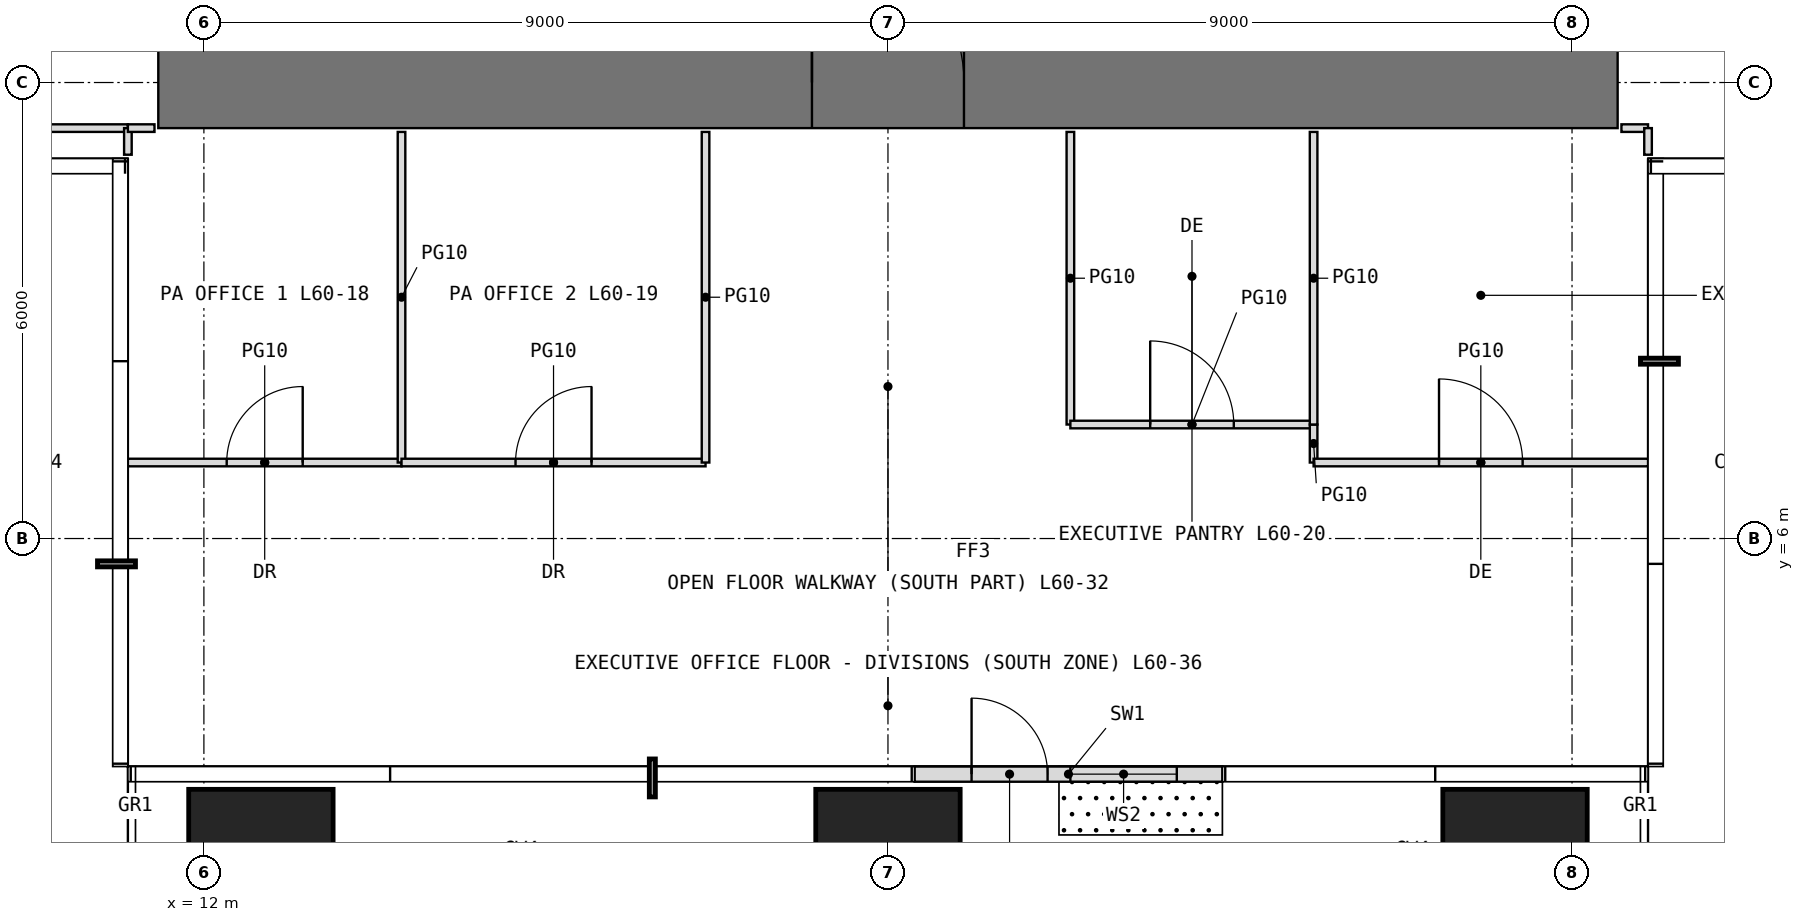
"""IFC4 building model, lengths in metres.
Left out: names, types, materials, properties, quantities, classifications, styles, units other than length and angle.
Written with IfcOpenShell. Run it as: python <this file> out.ifc"""

import sys

from ifc_helpers import new_model, si_unit, direction, frame, frame_2d, origin, origin_2d, place, context, subcontext, project, spatial, rectangle, extrude, element, fill, save


model = new_model("IFC4")
c1 = context("Model", 3, precision=1e-05, world=origin(), true_north=direction((0.0, 1.0)))
c2 = subcontext(c1, "Body", "Model", "MODEL_VIEW")
j1 = project(units=[si_unit("LENGTHUNIT", "METRE"), si_unit("PLANEANGLEUNIT", "RADIAN")], contexts=[c1])
p1 = place(None, origin())
s1 = spatial("IfcSite", under=j1, at=p1, CompositionType="ELEMENT")
p2 = place(p1, origin())
s2 = spatial("IfcBuilding", under=s1, at=p2, CompositionType="ELEMENT")
p3 = place(p2, frame((0.0, 0.0, 252.4)))
s3 = spatial("IfcBuildingStorey", under=s2, at=p3, CompositionType="ELEMENT", Elevation=252.4)
for number, where, z_axis, x_axis in (
    (1, (12.75, 1.75, 0.0), (0.0, 0.0, 1.0), (1.0, 0.0, 0.0)),
    (2, (21.0, 1.75, 0.0), (0.0, 0.0, 1.0), (1.0, 0.0, 0.0)),
    (3, (29.25, 1.75, 0.0), (0.0, 0.0, 1.0), (1.0, 0.0, 0.0)),
):
    element("IfcColumn", number, at=place(p3, frame(where, z_axis=z_axis, x_axis=x_axis)), inside=s3, PredefinedType="COLUMN", context=c2, shape_type="SweptSolid", body=[
        extrude(rectangle(XDim=1.9, YDim=1.9, at=origin_2d()), origin(), (0.0, 0.0, 1.0), 4.2),
    ])
p4 = place(p3, frame((21.35, 2.9, 0.0), z_axis=(0.0, 0.0, 1.0), x_axis=(1.0, 0.0, 0.0)))
e4 = element("IfcWall", 4, at=p4, inside=s3, PredefinedType="USERDEFINED", context=c2, shape_type="SweptSolid", body=[
    extrude(rectangle(XDim=4.05, YDim=0.2, at=frame_2d((2.025, 0.0))), origin(), (0.0, 0.0, 1.0), 3.95),
])
p5 = place(p4, frame((0.75, 0.0, 0.0)))
e5 = element("IfcOpeningElement", 5, at=p5, cuts=e4, PredefinedType="OPENING", context=c2, shape_type="SweptSolid", body=[
    extrude(rectangle(XDim=1.0, YDim=2.4, at=frame_2d((0.5, 1.2))), frame((0.0, 0.11, 0.0), z_axis=(0.0, -1.0, 0.0), x_axis=(1.0, 0.0, 0.0)), (0.0, 0.0, 1.0), 0.22),
])
p6 = place(p4, frame((2.05, 0.0, 0.3)))
e6 = element("IfcOpeningElement", 6, at=p6, cuts=e4, PredefinedType="OPENING", context=c2, shape_type="SweptSolid", body=[
    extrude(rectangle(XDim=1.4, YDim=2.7, at=frame_2d((0.7, 1.35))), frame((0.0, 0.11, 0.0), z_axis=(0.0, -1.0, 0.0), x_axis=(1.0, 0.0, 0.0)), (0.0, 0.0, 1.0), 0.22),
])
p7 = place(p3, frame((11.4, 12.0, -0.05), z_axis=(0.0, 0.0, 1.0), x_axis=(1.0, 0.0, 0.0)))
e7 = element("IfcWall", 7, at=p7, inside=s3, PredefinedType="SHEAR", context=c2, shape_type="SweptSolid", body=[
    extrude(rectangle(XDim=19.2, YDim=1.2, at=frame_2d((9.6, 0.0))), origin(), (0.0, 0.0, 1.0), 4.2),
])
p8 = place(p7, frame((8.6, 0.0, 0.05)))
e8 = element("IfcOpeningElement", 8, at=p8, cuts=e7, PredefinedType="OPENING", context=c2, shape_type="SweptSolid", body=[
    extrude(rectangle(XDim=2.0, YDim=2.2, at=frame_2d((1.0, 1.1))), frame((0.0, 0.61, 0.0), z_axis=(0.0, -1.0, 0.0), x_axis=(1.0, 0.0, 0.0)), (0.0, 0.0, 1.0), 1.22),
])
p9 = place(p3, frame((8.4, 11.4, 0.0), z_axis=(0.0, 0.0, 1.0), x_axis=(1.0, 0.0, 0.0)))
e9 = element("IfcWall", 9, at=p9, inside=s3, PredefinedType="PARTITIONING", context=c2, shape_type="SweptSolid", body=[
    extrude(rectangle(XDim=2.6, YDim=0.1, at=frame_2d((1.3, 0.0))), origin(), (0.0, 0.0, 1.0), 3.95),
])
p10 = place(p3, frame((11.0, 7.0, 0.0), z_axis=(0.0, 0.0, 1.0), x_axis=(1.0, 0.0, 0.0)))
e10 = element("IfcWall", 10, at=p10, inside=s3, PredefinedType="PARTITIONING", context=c2, shape_type="SweptSolid", body=[
    extrude(rectangle(XDim=3.6, YDim=0.1, at=frame_2d((1.8, 0.0))), origin(), (0.0, 0.0, 1.0), 3.95),
])
p11 = place(p10, frame((1.3, 0.0, 0.0)))
e11 = element("IfcOpeningElement", 11, at=p11, cuts=e10, PredefinedType="OPENING", context=c2, shape_type="SweptSolid", body=[
    extrude(rectangle(XDim=1.0, YDim=2.2, at=frame_2d((0.5, 1.1))), frame((0.0, 0.06, 0.0), z_axis=(0.0, -1.0, 0.0), x_axis=(1.0, 0.0, 0.0)), (0.0, 0.0, 1.0), 0.12),
])
p12 = place(p3, frame((11.0, 11.05, 0.0), z_axis=(0.0, 0.0, 1.0), x_axis=(0.0, 1.0, 0.0)))
e12 = element("IfcWall", 12, at=p12, inside=s3, PredefinedType="PARTITIONING", context=c2, shape_type="SweptSolid", body=[
    extrude(rectangle(XDim=0.35, YDim=0.1, at=frame_2d((0.175, 0.0))), origin(), (0.0, 0.0, 1.0), 3.95),
])
p13 = place(p3, frame((11.0, 11.4, 0.0), z_axis=(0.0, 0.0, 1.0), x_axis=(1.0, 0.0, 0.0)))
e13 = element("IfcWall", 13, at=p13, inside=s3, PredefinedType="PARTITIONING", context=c2, shape_type="SweptSolid", body=[
    extrude(rectangle(XDim=0.35, YDim=0.1, at=frame_2d((0.175, 0.0))), origin(), (0.0, 0.0, 1.0), 3.95),
])
p14 = place(p3, frame((14.6, 7.0, 0.0), z_axis=(0.0, 0.0, 1.0), x_axis=(0.0, 1.0, 0.0)))
e14 = element("IfcWall", 14, at=p14, inside=s3, PredefinedType="PARTITIONING", context=c2, shape_type="SweptSolid", body=[
    extrude(rectangle(XDim=4.35, YDim=0.1, at=frame_2d((2.175, 0.0))), origin(), (0.0, 0.0, 1.0), 3.95),
])
p15 = place(p3, frame((14.6, 7.0, 0.0), z_axis=(0.0, 0.0, 1.0), x_axis=(1.0, 0.0, 0.0)))
e15 = element("IfcWall", 15, at=p15, inside=s3, PredefinedType="PARTITIONING", context=c2, shape_type="SweptSolid", body=[
    extrude(rectangle(XDim=4.0, YDim=0.1, at=frame_2d((2.0, 0.0))), origin(), (0.0, 0.0, 1.0), 3.95),
])
p16 = place(p15, frame((1.5, 0.0, 0.0)))
e16 = element("IfcOpeningElement", 16, at=p16, cuts=e15, PredefinedType="OPENING", context=c2, shape_type="SweptSolid", body=[
    extrude(rectangle(XDim=1.0, YDim=2.2, at=frame_2d((0.5, 1.1))), frame((0.0, 0.06, 0.0), z_axis=(0.0, -1.0, 0.0), x_axis=(1.0, 0.0, 0.0)), (0.0, 0.0, 1.0), 0.12),
])
p17 = place(p3, frame((18.6, 7.0, 0.0), z_axis=(0.0, 0.0, 1.0), x_axis=(0.0, 1.0, 0.0)))
e17 = element("IfcWall", 17, at=p17, inside=s3, PredefinedType="PARTITIONING", context=c2, shape_type="SweptSolid", body=[
    extrude(rectangle(XDim=4.35, YDim=0.1, at=frame_2d((2.175, 0.0))), origin(), (0.0, 0.0, 1.0), 3.95),
])
p18 = place(p3, frame((23.4, 7.5, 0.0), z_axis=(0.0, 0.0, 1.0), x_axis=(0.0, 1.0, 0.0)))
e18 = element("IfcWall", 18, at=p18, inside=s3, PredefinedType="PARTITIONING", context=c2, shape_type="SweptSolid", body=[
    extrude(rectangle(XDim=3.85, YDim=0.1, at=frame_2d((1.925, 0.0))), origin(), (0.0, 0.0, 1.0), 3.95),
])
p19 = place(p3, frame((23.4, 7.5, 0.0), z_axis=(0.0, 0.0, 1.0), x_axis=(1.0, 0.0, 0.0)))
e19 = element("IfcWall", 19, at=p19, inside=s3, PredefinedType="PARTITIONING", context=c2, shape_type="SweptSolid", body=[
    extrude(rectangle(XDim=3.2, YDim=0.1, at=frame_2d((1.6, 0.0))), origin(), (0.0, 0.0, 1.0), 3.95),
])
p20 = place(p19, frame((1.05, 0.0, 0.0)))
e20 = element("IfcOpeningElement", 20, at=p20, cuts=e19, PredefinedType="OPENING", context=c2, shape_type="SweptSolid", body=[
    extrude(rectangle(XDim=1.1, YDim=2.3, at=frame_2d((0.55, 1.15))), frame((0.0, 0.06, 0.0), z_axis=(0.0, -1.0, 0.0), x_axis=(1.0, 0.0, 0.0)), (0.0, 0.0, 1.0), 0.12),
])
p21 = place(p3, frame((26.6, 7.0, 0.0), z_axis=(0.0, 0.0, 1.0), x_axis=(0.0, 1.0, 0.0)))
e21 = element("IfcWall", 21, at=p21, inside=s3, PredefinedType="PARTITIONING", context=c2, shape_type="SweptSolid", body=[
    extrude(rectangle(XDim=0.5, YDim=0.1, at=frame_2d((0.25, 0.0))), origin(), (0.0, 0.0, 1.0), 3.95),
])
p22 = place(p3, frame((26.6, 7.0, 0.0), z_axis=(0.0, 0.0, 1.0), x_axis=(1.0, 0.0, 0.0)))
e22 = element("IfcWall", 22, at=p22, inside=s3, PredefinedType="PARTITIONING", context=c2, shape_type="SweptSolid", body=[
    extrude(rectangle(XDim=4.4, YDim=0.1, at=frame_2d((2.2, 0.0))), origin(), (0.0, 0.0, 1.0), 3.95),
])
p23 = place(p22, frame((1.65, 0.0, 0.0)))
e23 = element("IfcOpeningElement", 23, at=p23, cuts=e22, PredefinedType="OPENING", context=c2, shape_type="SweptSolid", body=[
    extrude(rectangle(XDim=1.1, YDim=2.3, at=frame_2d((0.55, 1.15))), frame((0.0, 0.06, 0.0), z_axis=(0.0, -1.0, 0.0), x_axis=(1.0, 0.0, 0.0)), (0.0, 0.0, 1.0), 0.12),
])
p24 = place(p3, frame((26.6, 7.5, 0.0), z_axis=(0.0, 0.0, 1.0), x_axis=(0.0, 1.0, 0.0)))
e24 = element("IfcWall", 24, at=p24, inside=s3, PredefinedType="PARTITIONING", context=c2, shape_type="SweptSolid", body=[
    extrude(rectangle(XDim=3.85, YDim=0.1, at=frame_2d((1.925, 0.0))), origin(), (0.0, 0.0, 1.0), 3.95),
])
p25 = place(p3, frame((30.65, 11.4, 0.0), z_axis=(0.0, 0.0, 1.0), x_axis=(1.0, 0.0, 0.0)))
e25 = element("IfcWall", 25, at=p25, inside=s3, PredefinedType="PARTITIONING", context=c2, shape_type="SweptSolid", body=[
    extrude(rectangle(XDim=0.35, YDim=0.1, at=frame_2d((0.175, 0.0))), origin(), (0.0, 0.0, 1.0), 3.95),
])
p26 = place(p3, frame((31.0, 11.05, 0.0), z_axis=(0.0, 0.0, 1.0), x_axis=(0.0, 1.0, 0.0)))
e26 = element("IfcWall", 26, at=p26, inside=s3, PredefinedType="PARTITIONING", context=c2, shape_type="SweptSolid", body=[
    extrude(rectangle(XDim=0.35, YDim=0.1, at=frame_2d((0.175, 0.0))), origin(), (0.0, 0.0, 1.0), 3.95),
])
p27 = place(p5, origin())
e27 = element("IfcDoor", 27, at=p27, inside=s3, OperationType="SINGLE_SWING_LEFT", PredefinedType="DOOR", context=c2, shape_type="SweptSolid", body=[
    extrude(rectangle(XDim=1.0, YDim=2.4, at=frame_2d((0.5, 1.2))), frame((0.0, 0.025, 0.0), z_axis=(0.0, -1.0, 0.0), x_axis=(1.0, 0.0, 0.0)), (0.0, 0.0, 1.0), 0.05),
])
fill(e5, e27)
p28 = place(p6, origin())
e28 = element("IfcWindow", 28, at=p28, inside=s3, PartitioningType="SINGLE_PANEL", PredefinedType="WINDOW", context=c2, shape_type="SweptSolid", body=[
    extrude(rectangle(XDim=1.4, YDim=2.7, at=frame_2d((0.7, 1.35))), frame((0.0, 0.03, 0.0), z_axis=(0.0, -1.0, 0.0), x_axis=(1.0, 0.0, 0.0)), (0.0, 0.0, 1.0), 0.06),
])
fill(e6, e28)
p29 = place(p8, origin())
e29 = element("IfcDoor", 29, at=p29, inside=s3, OperationType="DOUBLE_DOOR_SINGLE_SWING", PredefinedType="DOOR", context=c2, shape_type="SweptSolid", body=[
    extrude(rectangle(XDim=2.0, YDim=2.2, at=frame_2d((1.0, 1.1))), frame((0.0, 0.025, 0.0), z_axis=(0.0, -1.0, 0.0), x_axis=(1.0, 0.0, 0.0)), (0.0, 0.0, 1.0), 0.05),
])
fill(e8, e29)
p30 = place(p11, origin())
e30 = element("IfcDoor", 30, at=p30, inside=s3, OperationType="SINGLE_SWING_RIGHT", PredefinedType="DOOR", context=c2, shape_type="SweptSolid", body=[
    extrude(rectangle(XDim=1.0, YDim=2.2, at=frame_2d((0.5, 1.1))), frame((0.0, 0.025, 0.0), z_axis=(0.0, -1.0, 0.0), x_axis=(1.0, 0.0, 0.0)), (0.0, 0.0, 1.0), 0.05),
])
fill(e11, e30)
p31 = place(p16, origin())
e31 = element("IfcDoor", 31, at=p31, inside=s3, OperationType="SINGLE_SWING_RIGHT", PredefinedType="DOOR", context=c2, shape_type="SweptSolid", body=[
    extrude(rectangle(XDim=1.0, YDim=2.2, at=frame_2d((0.5, 1.1))), frame((0.0, 0.025, 0.0), z_axis=(0.0, -1.0, 0.0), x_axis=(1.0, 0.0, 0.0)), (0.0, 0.0, 1.0), 0.05),
])
fill(e16, e31)
p32 = place(p20, origin())
e32 = element("IfcDoor", 32, at=p32, inside=s3, OperationType="SINGLE_SWING_LEFT", PredefinedType="DOOR", context=c2, shape_type="SweptSolid", body=[
    extrude(rectangle(XDim=1.1, YDim=2.3, at=frame_2d((0.55, 1.15))), frame((0.0, 0.025, 0.0), z_axis=(0.0, -1.0, 0.0), x_axis=(1.0, 0.0, 0.0)), (0.0, 0.0, 1.0), 0.05),
])
fill(e20, e32)
p33 = place(p23, origin())
e33 = element("IfcDoor", 33, at=p33, inside=s3, OperationType="SINGLE_SWING_LEFT", PredefinedType="DOOR", context=c2, shape_type="SweptSolid", body=[
    extrude(rectangle(XDim=1.1, YDim=2.3, at=frame_2d((0.55, 1.15))), frame((0.0, 0.025, 0.0), z_axis=(0.0, -1.0, 0.0), x_axis=(1.0, 0.0, 0.0)), (0.0, 0.0, 1.0), 0.05),
])
fill(e23, e33)
save(model, sys.argv[1])
